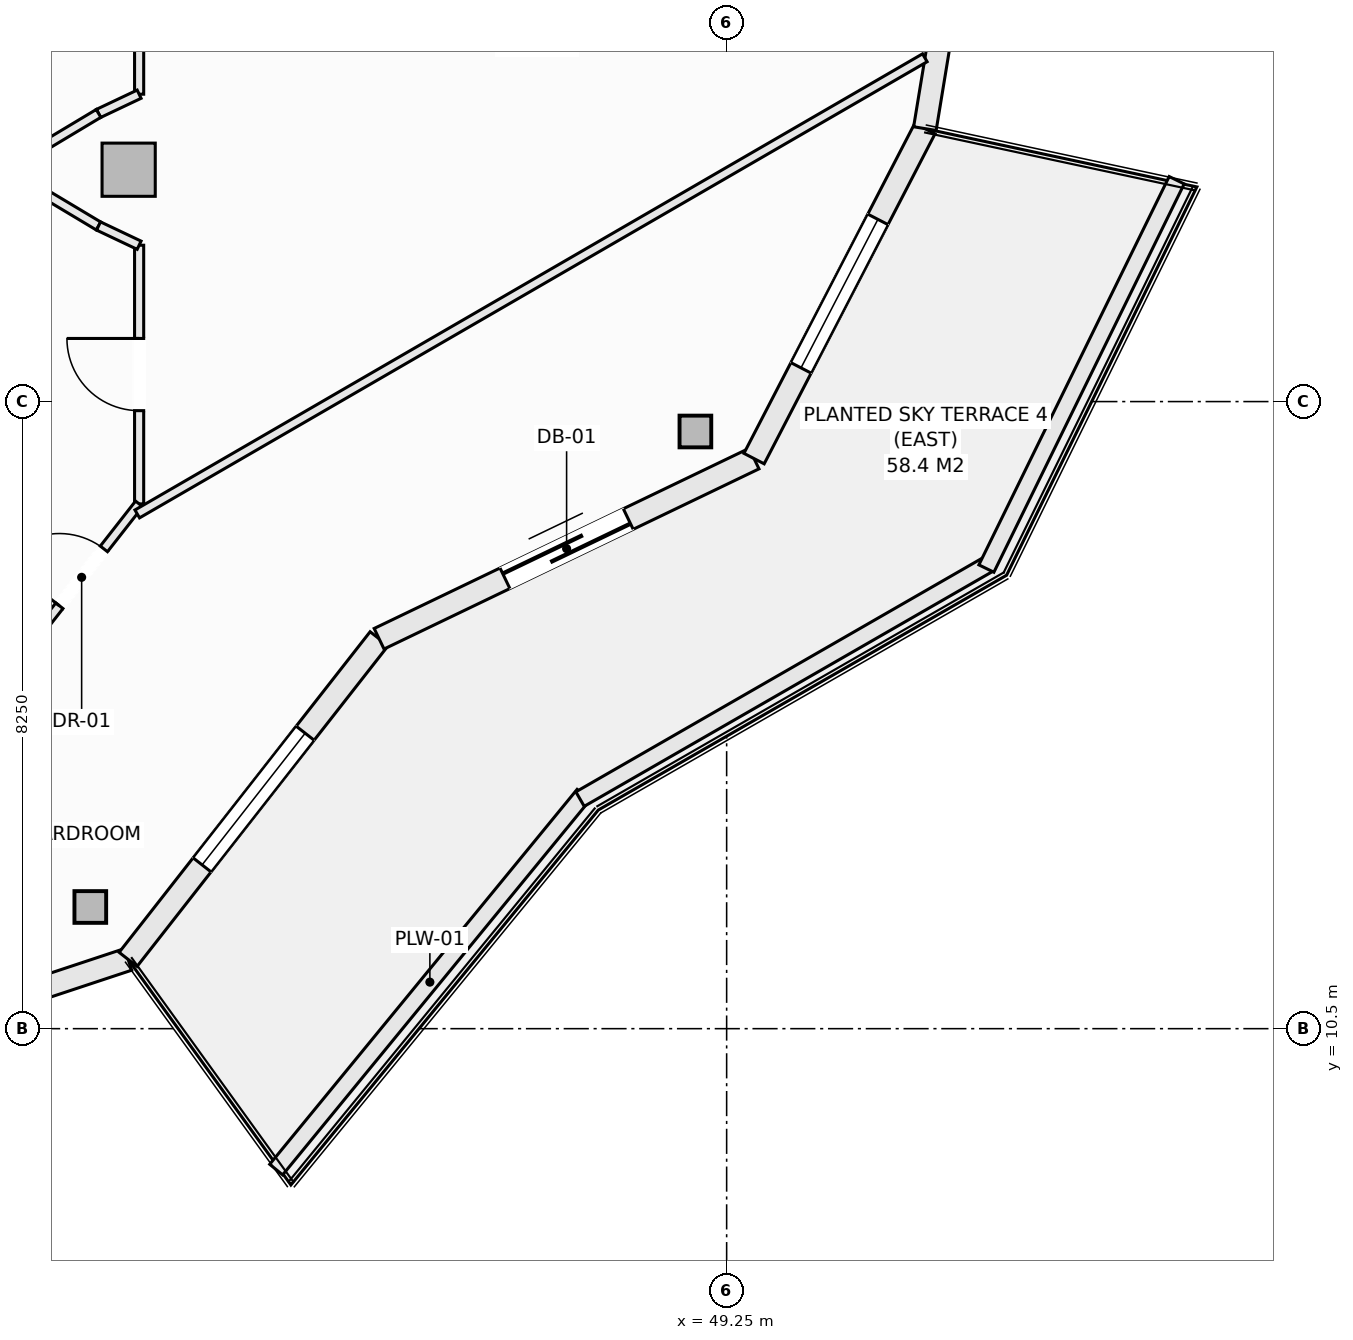
"""IFC4 building model, lengths in metres.
Left out: names, types, materials, properties, quantities, classifications, styles, units other than length and angle.
Written with IfcOpenShell. Run it as: python <this file> out.ifc"""

import sys

from ifc_helpers import new_model, si_unit, direction, frame, frame_2d, origin, origin_2d, place, context, subcontext, project, spatial, rectangle, hollow_rectangle, extrude, element, fill, save


model = new_model("IFC4")
c1 = context("Model", 3, precision=1e-05, world=origin(), true_north=direction((0.0, 1.0)))
c2 = subcontext(c1, "Body", "Model", "MODEL_VIEW")
j1 = project(units=[si_unit("LENGTHUNIT", "METRE"), si_unit("PLANEANGLEUNIT", "RADIAN")], contexts=[c1])
p1 = place(None, origin())
s1 = spatial("IfcSite", under=j1, at=p1, CompositionType="ELEMENT")
p2 = place(p1, origin())
s2 = spatial("IfcBuilding", under=s1, at=p2, CompositionType="ELEMENT")
p3 = place(p2, frame((0.0, 0.0, 255.8)))
s3 = spatial("IfcBuildingStorey", under=s2, at=p3, CompositionType="ELEMENT", Elevation=255.8)
for number, where, z_axis, x_axis in (
    (1, (40.878, 12.101, -0.27), (0.0, 0.0, 1.0), (1.0, 0.0, 0.0)),
    (2, (48.839, 18.356, -0.27), (0.0, 0.0, 1.0), (1.0, 0.0, 0.0)),
):
    element("IfcColumn", number, at=place(p3, frame(where, z_axis=z_axis, x_axis=x_axis)), inside=s3, PredefinedType="COLUMN", context=c2, shape_type="SweptSolid", body=[
        extrude(hollow_rectangle(XDim=0.406, YDim=0.406, WallThickness=0.016, at=origin_2d()), origin(), (0.0, 0.0, 1.0), 3.3),
    ])
p4 = place(p3, frame((41.382, 21.801, -0.27), z_axis=(0.0, 0.0, 1.0), x_axis=(1.0, 0.0, 0.0)))
e3 = element("IfcColumn", 3, at=p4, inside=s3, PredefinedType="COLUMN", context=c2, shape_type="SweptSolid", body=[
    extrude(rectangle(XDim=0.7, YDim=0.7, at=origin_2d()), origin(), (0.0, 0.0, 1.0), 3.3),
])
p5 = place(p3, frame((35.948, 9.613, 0.0), z_axis=(0.0, 0.0, 1.0), x_axis=(0.949232769585, 0.314574552605, 0.0)))
e4 = element("IfcWall", 4, at=p5, inside=s3, PredefinedType="SOLIDWALL", context=c2, shape_type="SweptSolid", body=[
    extrude(rectangle(XDim=5.717, YDim=0.3, at=frame_2d((2.858, 0.0))), origin(), (0.0, 0.0, 1.0), 2.605),
])
p6 = place(p5, frame((1.758, 0.0, 0.72)))
e5 = element("IfcOpeningElement", 5, at=p6, cuts=e4, PredefinedType="OPENING", context=c2, shape_type="SweptSolid", body=[
    extrude(rectangle(XDim=2.2, YDim=1.65, at=frame_2d((1.1, 0.825))), frame((0.0, 0.16, 0.0), z_axis=(0.0, -1.0, 0.0), x_axis=(1.0, 0.0, 0.0)), (0.0, 0.0, 1.0), 0.32),
])
p7 = place(p3, frame((41.375, 11.412, 0.0), z_axis=(0.0, 0.0, 1.0), x_axis=(0.61644588519, 0.787397276241, 0.0)))
e6 = element("IfcWall", 6, at=p7, inside=s3, PredefinedType="SOLIDWALL", context=c2, shape_type="SweptSolid", body=[
    extrude(rectangle(XDim=5.357, YDim=0.3, at=frame_2d((2.678, 0.0))), origin(), (0.0, 0.0, 1.0), 2.605),
])
p8 = place(p7, frame((1.579, 0.0, 0.72)))
e7 = element("IfcOpeningElement", 7, at=p8, cuts=e6, PredefinedType="OPENING", context=c2, shape_type="SweptSolid", body=[
    extrude(rectangle(XDim=2.2, YDim=1.65, at=frame_2d((1.1, 0.825))), frame((0.0, 0.16, 0.0), z_axis=(0.0, -1.0, 0.0), x_axis=(1.0, 0.0, 0.0)), (0.0, 0.0, 1.0), 0.32),
])
p9 = place(p3, frame((44.677, 15.63, 0.0), z_axis=(0.0, 0.0, 1.0), x_axis=(0.901355238351, 0.433080517106, 0.0)))
e8 = element("IfcWall", 8, at=p9, inside=s3, PredefinedType="SOLIDWALL", context=c2, shape_type="SweptSolid", body=[
    extrude(rectangle(XDim=5.473, YDim=0.3, at=frame_2d((2.737, 0.0))), origin(), (0.0, 0.0, 1.0), 2.605),
])
p10 = place(p9, frame((1.837, 0.0, 0.0)))
e9 = element("IfcOpeningElement", 9, at=p10, cuts=e8, PredefinedType="OPENING", context=c2, shape_type="SweptSolid", body=[
    extrude(rectangle(XDim=1.8, YDim=2.25, at=frame_2d((0.9, 1.125))), frame((0.0, 0.16, 0.0), z_axis=(0.0, -1.0, 0.0), x_axis=(1.0, 0.0, 0.0)), (0.0, 0.0, 1.0), 0.32),
])
p11 = place(p3, frame((49.611, 18.0, 0.0), z_axis=(0.0, 0.0, 1.0), x_axis=(0.459793771602, 0.888025724625, 0.0)))
e10 = element("IfcWall", 10, at=p11, inside=s3, PredefinedType="SOLIDWALL", context=c2, shape_type="SweptSolid", body=[
    extrude(rectangle(XDim=4.889, YDim=0.3, at=frame_2d((2.444, 0.0))), origin(), (0.0, 0.0, 1.0), 2.605),
])
p12 = place(p11, frame((1.344, 0.0, 0.72)))
e11 = element("IfcOpeningElement", 11, at=p12, cuts=e10, PredefinedType="OPENING", context=c2, shape_type="SweptSolid", body=[
    extrude(rectangle(XDim=2.2, YDim=1.65, at=frame_2d((1.1, 0.825))), frame((0.0, 0.16, 0.0), z_axis=(0.0, -1.0, 0.0), x_axis=(1.0, 0.0, 0.0)), (0.0, 0.0, 1.0), 0.32),
])
p13 = place(p3, frame((51.858, 22.341, 0.0), z_axis=(0.0, 0.0, 1.0), x_axis=(0.162369371657, 0.986730047758, 0.0)))
e12 = element("IfcWall", 12, at=p13, inside=s3, PredefinedType="SOLIDWALL", context=c2, shape_type="SweptSolid", body=[
    extrude(rectangle(XDim=4.721, YDim=0.3, at=frame_2d((2.361, 0.0))), origin(), (0.0, 0.0, 1.0), 2.605),
])
p14 = place(p13, frame((1.261, 0.0, 0.72)))
e13 = element("IfcOpeningElement", 13, at=p14, cuts=e12, PredefinedType="OPENING", context=c2, shape_type="SweptSolid", body=[
    extrude(rectangle(XDim=2.2, YDim=1.65, at=frame_2d((1.1, 0.825))), frame((0.0, 0.16, 0.0), z_axis=(0.0, -1.0, 0.0), x_axis=(1.0, 0.0, 0.0)), (0.0, 0.0, 1.0), 0.32),
])
p15 = place(p3, frame((43.323, 8.646, 0.0), z_axis=(0.0, 0.0, 1.0), x_axis=(0.63407318032, 0.77327304492, 0.0)))
e14 = element("IfcWall", 14, at=p15, inside=s3, PredefinedType="PARAPET", context=c2, shape_type="SweptSolid", body=[
    extrude(rectangle(XDim=6.379, YDim=0.22, at=frame_2d((3.189, 0.0))), origin(), (0.0, 0.0, 1.0), 0.52),
])
p16 = place(p3, frame((47.321, 13.521, 0.0), z_axis=(0.0, 0.0, 1.0), x_axis=(0.866901621005, 0.49847926687, 0.0)))
e15 = element("IfcWall", 15, at=p16, inside=s3, PredefinedType="PARAPET", context=c2, shape_type="SweptSolid", body=[
    extrude(rectangle(XDim=6.197, YDim=0.22, at=frame_2d((3.098, 0.0))), origin(), (0.0, 0.0, 1.0), 0.52),
])
p17 = place(p3, frame((52.667, 16.553, 0.0), z_axis=(0.0, 0.0, 1.0), x_axis=(0.440058847499, 0.897968936399, 0.0)))
e16 = element("IfcWall", 16, at=p17, inside=s3, PredefinedType="PARAPET", context=c2, shape_type="SweptSolid", body=[
    extrude(rectangle(XDim=5.689, YDim=0.22, at=frame_2d((2.845, 0.0))), origin(), (0.0, 0.0, 1.0), 0.52),
])
p18 = place(p3, frame((41.52, 17.404, 0.0), z_axis=(0.0, 0.0, 1.0), x_axis=(0.0, 1.0, 0.0)))
e17 = element("IfcWall", 17, at=p18, inside=s3, PredefinedType="PARTITIONING", context=c2, shape_type="SweptSolid", body=[
    extrude(rectangle(XDim=3.403, YDim=0.12, at=frame_2d((1.701, 0.0))), origin(), (0.0, 0.0, 1.0), 3.03),
])
p19 = place(p18, frame((1.227, 0.0, 0.0)))
e18 = element("IfcOpeningElement", 18, at=p19, cuts=e17, PredefinedType="OPENING", context=c2, shape_type="SweptSolid", body=[
    extrude(rectangle(XDim=0.95, YDim=2.1, at=frame_2d((0.475, 1.05))), frame((0.0, 0.07, 0.0), z_axis=(0.0, -1.0, 0.0), x_axis=(1.0, 0.0, 0.0)), (0.0, 0.0, 1.0), 0.14),
])
p20 = place(p3, frame((41.52, 22.794, 0.0), z_axis=(0.0, 0.0, 1.0), x_axis=(0.0, 1.0, 0.0)))
e19 = element("IfcWall", 19, at=p20, inside=s3, PredefinedType="PARTITIONING", context=c2, shape_type="SweptSolid", body=[
    extrude(rectangle(XDim=8.412, YDim=0.12, at=frame_2d((4.206, 0.0))), origin(), (0.0, 0.0, 1.0), 2.478),
])
p21 = place(p3, frame((40.986, 22.541, 0.0), z_axis=(0.0, 0.0, 1.0), x_axis=(0.903729424576, 0.428104107847, 0.0)))
e20 = element("IfcWall", 20, at=p21, inside=s3, PredefinedType="PARTITIONING", context=c2, shape_type="SweptSolid", body=[
    extrude(rectangle(XDim=0.591, YDim=0.12, at=frame_2d((0.295, 0.0))), origin(), (0.0, 0.0, 1.0), 3.03),
])
p22 = place(p3, frame((39.75, 21.8, 0.0), z_axis=(0.0, 0.0, 1.0), x_axis=(0.857702120906, 0.514146935996, 0.0)))
e21 = element("IfcWall", 21, at=p22, inside=s3, PredefinedType="PARTITIONING", context=c2, shape_type="SweptSolid", body=[
    extrude(rectangle(XDim=1.441, YDim=0.12, at=frame_2d((0.721, 0.0))), origin(), (0.0, 0.0, 1.0), 3.03),
])
p23 = place(p3, frame((39.81, 21.764, 0.0), z_axis=(0.0, 0.0, 1.0), x_axis=(0.858011245414, -0.513630901273, 0.0)))
e22 = element("IfcWall", 22, at=p23, inside=s3, PredefinedType="PARTITIONING", context=c2, shape_type="SweptSolid", body=[
    extrude(rectangle(XDim=1.37, YDim=0.12, at=frame_2d((0.685, 0.0))), origin(), (0.0, 0.0, 1.0), 3.03),
])
p24 = place(p3, frame((40.986, 21.06, 0.0), z_axis=(0.0, 0.0, 1.0), x_axis=(0.90356951601, -0.428441512621, 0.0)))
e23 = element("IfcWall", 23, at=p24, inside=s3, PredefinedType="PARTITIONING", context=c2, shape_type="SweptSolid", body=[
    extrude(rectangle(XDim=0.591, YDim=0.12, at=frame_2d((0.295, 0.0))), origin(), (0.0, 0.0, 1.0), 3.03),
])
p25 = place(p3, frame((39.662, 15.031, 0.0), z_axis=(0.0, 0.0, 1.0), x_axis=(0.616500468458, 0.787354540465, 0.0)))
e24 = element("IfcWall", 24, at=p25, inside=s3, PredefinedType="PARTITIONING", context=c2, shape_type="SweptSolid", body=[
    extrude(rectangle(XDim=3.014, YDim=0.12, at=frame_2d((1.507, 0.0))), origin(), (0.0, 0.0, 1.0), 3.03),
])
p26 = place(p25, frame((1.312, 0.0, 0.0)))
e25 = element("IfcOpeningElement", 25, at=p26, cuts=e24, PredefinedType="OPENING", context=c2, shape_type="SweptSolid", body=[
    extrude(rectangle(XDim=0.95, YDim=2.1, at=frame_2d((0.475, 1.05))), frame((0.0, 0.07, 0.0), z_axis=(0.0, -1.0, 0.0), x_axis=(1.0, 0.0, 0.0)), (0.0, 0.0, 1.0), 0.14),
])
p27 = place(p3, frame((41.495, 17.272, 0.0), z_axis=(0.0, 0.0, 1.0), x_axis=(0.865359277242, 0.501151994201, 0.0)))
e26 = element("IfcWall", 26, at=p27, inside=s3, PredefinedType="PARTITIONING", context=c2, shape_type="SweptSolid", body=[
    extrude(rectangle(XDim=11.975, YDim=0.12, at=frame_2d((5.987, 0.0))), origin(), (0.0, 0.0, 1.0), 3.03),
])
p28 = place(p8, origin())
e27 = element("IfcWindow", 27, at=p28, inside=s3, PartitioningType="SINGLE_PANEL", PredefinedType="WINDOW", context=c2, shape_type="SweptSolid", body=[
    extrude(rectangle(XDim=2.2, YDim=1.65, at=frame_2d((1.1, 0.825))), frame((0.0, 0.03, 0.0), z_axis=(0.0, -1.0, 0.0), x_axis=(1.0, 0.0, 0.0)), (0.0, 0.0, 1.0), 0.06),
])
fill(e7, e27)
p29 = place(p10, frame((1.8, 0.0, 0.0), z_axis=(0.0, 0.0, 1.0), x_axis=(-1.0, 0.0, 0.0)))
e28 = element("IfcDoor", 28, at=p29, inside=s3, OperationType="SLIDING_TO_LEFT", PredefinedType="DOOR", context=c2, shape_type="SweptSolid", body=[
    extrude(rectangle(XDim=1.8, YDim=2.25, at=frame_2d((0.9, 1.125))), frame((0.0, 0.025, 0.0), z_axis=(0.0, -1.0, 0.0), x_axis=(1.0, 0.0, 0.0)), (0.0, 0.0, 1.0), 0.05),
])
fill(e9, e28)
p30 = place(p12, origin())
e29 = element("IfcWindow", 29, at=p30, inside=s3, PartitioningType="SINGLE_PANEL", PredefinedType="WINDOW", context=c2, shape_type="SweptSolid", body=[
    extrude(rectangle(XDim=2.2, YDim=1.65, at=frame_2d((1.1, 0.825))), frame((0.0, 0.03, 0.0), z_axis=(0.0, -1.0, 0.0), x_axis=(1.0, 0.0, 0.0)), (0.0, 0.0, 1.0), 0.06),
])
fill(e11, e29)
p31 = place(p26, origin())
e30 = element("IfcDoor", 30, at=p31, inside=s3, OperationType="SINGLE_SWING_LEFT", PredefinedType="DOOR", context=c2, shape_type="SweptSolid", body=[
    extrude(rectangle(XDim=0.95, YDim=2.1, at=frame_2d((0.475, 1.05))), frame((0.0, 0.025, 0.0), z_axis=(0.0, -1.0, 0.0), x_axis=(1.0, 0.0, 0.0)), (0.0, 0.0, 1.0), 0.05),
])
fill(e25, e30)
p32 = place(p19, origin())
e31 = element("IfcDoor", 31, at=p32, inside=s3, OperationType="SINGLE_SWING_RIGHT", PredefinedType="DOOR", context=c2, shape_type="SweptSolid", body=[
    extrude(rectangle(XDim=0.95, YDim=2.1, at=frame_2d((0.475, 1.05))), frame((0.0, 0.025, 0.0), z_axis=(0.0, -1.0, 0.0), x_axis=(1.0, 0.0, 0.0)), (0.0, 0.0, 1.0), 0.05),
])
fill(e18, e31)
save(model, sys.argv[1])
